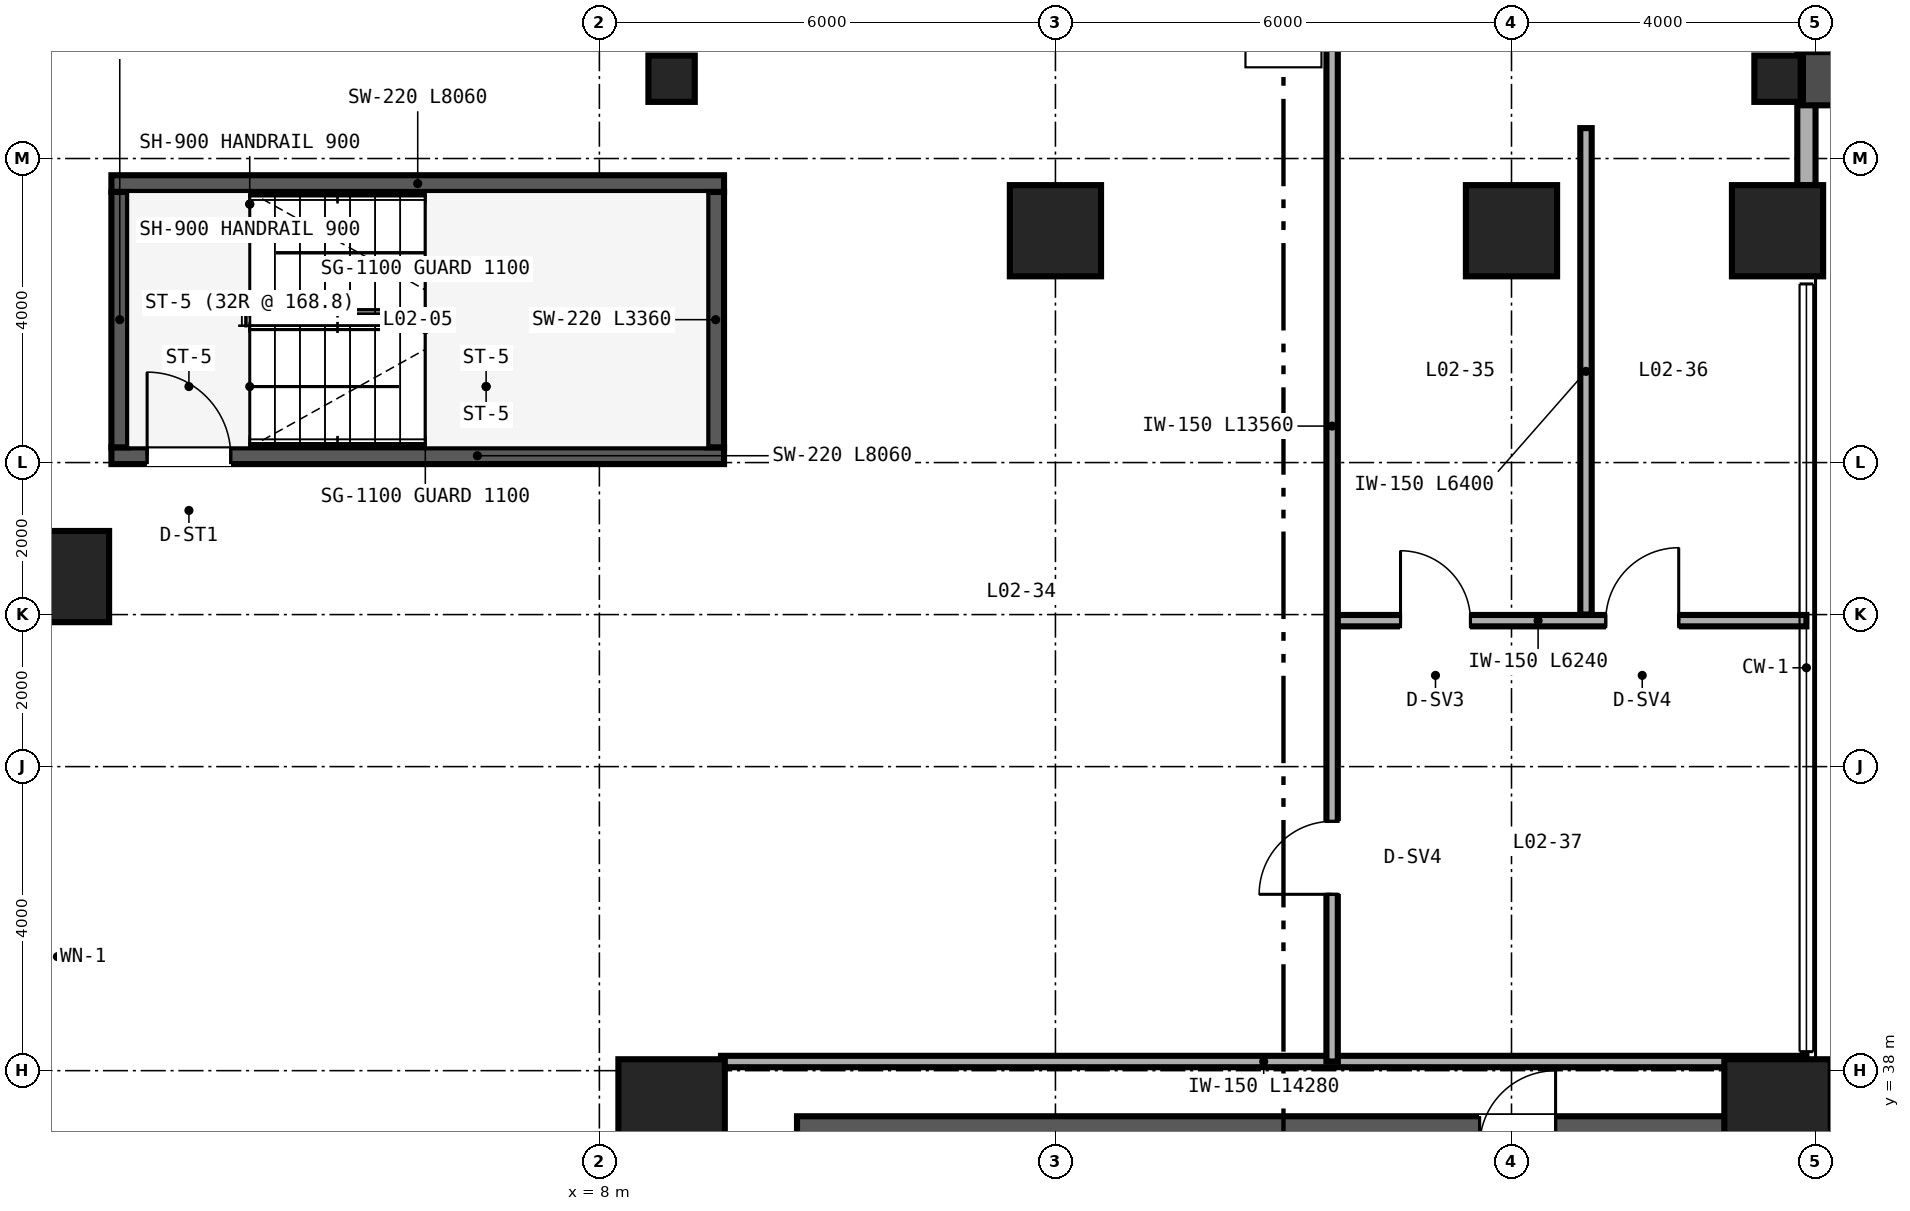
"""IFC4 building model, lengths in metres.
Left out: names, types, materials, properties, quantities, classifications, styles, units other than length and angle.
Written with IfcOpenShell. Run it as: python <this file> out.ifc"""

import sys

from ifc_helpers import new_model, si_unit, direction, frame, frame_2d, origin, origin_2d, place, context, subcontext, project, spatial, rectangle, hollow_circle, extrude, source, transform, mapped, element, fill, save


model = new_model("IFC4")
c1 = context("Model", 3, precision=1e-05, world=origin(), true_north=direction((0.0, 1.0)))
c2 = subcontext(c1, "Body", "Model", "MODEL_VIEW")
j1 = project(units=[si_unit("LENGTHUNIT", "METRE"), si_unit("PLANEANGLEUNIT", "RADIAN")], contexts=[c1])
p1 = place(None, origin())
s1 = spatial("IfcSite", under=j1, at=p1, CompositionType="ELEMENT")
p2 = place(p1, origin())
s2 = spatial("IfcBuilding", under=s1, at=p2, CompositionType="ELEMENT")
p3 = place(p2, frame((0.0, 0.0, 6.0)))
s3 = spatial("IfcBuildingStorey", under=s2, at=p3, CompositionType="ELEMENT", Elevation=6.0)
p4 = place(p3, frame((10.6, 37.0, 0.0), z_axis=(0.0, 0.0, 1.0), x_axis=(1.0, 0.0, 0.0)))
e1 = element("IfcWall", 1, at=p4, inside=s3, PredefinedType="SHEAR", context=c2, shape_type="SweptSolid", body=[
    extrude(rectangle(XDim=12.8, YDim=0.8, at=frame_2d((6.4, 0.0))), origin(), (0.0, 0.0, 1.0), 5.08),
])
p5 = place(p4, frame((8.98, 0.0, 0.0)))
e2 = element("IfcOpeningElement", 2, at=p5, cuts=e1, PredefinedType="OPENING", context=c2, shape_type="SweptSolid", body=[
    extrude(rectangle(XDim=1.0, YDim=2.15, at=frame_2d((0.5, 1.075))), frame((0.0, 0.41, 0.0), z_axis=(0.0, -1.0, 0.0), x_axis=(1.0, 0.0, 0.0)), (0.0, 0.0, 1.0), 0.82),
])
p6 = place(p3, frame((1.58, 46.09, 0.0), z_axis=(0.0, 0.0, 1.0), x_axis=(1.0, 0.0, 0.0)))
e3 = element("IfcWall", 3, at=p6, inside=s3, PredefinedType="SHEAR", context=c2, shape_type="SweptSolid", body=[
    extrude(rectangle(XDim=8.06, YDim=0.22, at=frame_2d((4.03, 0.0))), origin(), (0.0, 0.0, 1.0), 5.2),
])
p7 = place(p6, frame((0.47, 0.0, 0.0)))
e4 = element("IfcOpeningElement", 4, at=p7, cuts=e3, PredefinedType="OPENING", context=c2, shape_type="SweptSolid", body=[
    extrude(rectangle(XDim=1.1, YDim=2.15, at=frame_2d((0.55, 1.075))), frame((0.0, 0.12, 0.0), z_axis=(0.0, -1.0, 0.0), x_axis=(1.0, 0.0, 0.0)), (0.0, 0.0, 1.0), 0.24),
])
p8 = place(p3, frame((1.58, 49.67, 0.0), z_axis=(0.0, 0.0, 1.0), x_axis=(1.0, 0.0, 0.0)))
e5 = element("IfcWall", 5, at=p8, inside=s3, PredefinedType="SHEAR", context=c2, shape_type="SweptSolid", body=[
    extrude(rectangle(XDim=8.06, YDim=0.22, at=frame_2d((4.03, 0.0))), origin(), (0.0, 0.0, 1.0), 5.2),
])
for number, where, z_axis, x_axis in (
    (6, (1.69, 46.2, 0.0), (0.0, 0.0, 1.0), (0.0, 1.0, 0.0)),
    (7, (9.53, 46.2, 0.0), (0.0, 0.0, 1.0), (0.0, 1.0, 0.0)),
):
    element("IfcWall", number, at=place(p3, frame(where, z_axis=z_axis, x_axis=x_axis)), inside=s3, PredefinedType="SHEAR", context=c2, shape_type="SweptSolid", body=[
        extrude(rectangle(XDim=3.36, YDim=0.22, at=frame_2d((1.68, 0.0))), origin(), (0.0, 0.0, 1.0), 5.2),
    ])
m1 = source(origin(), c2, "Body", "SweptSolid", [
    extrude(rectangle(XDim=1.2, YDim=1.2, at=origin_2d()), origin(), (0.0, 0.0, 1.0), 5.08),
])
p9 = place(p3, frame((0.95, 44.5, 0.0), z_axis=(0.0, 0.0, 1.0), x_axis=(1.0, 0.0, 0.0)))
e8 = element("IfcColumn", 8, at=p9, inside=s3, PredefinedType="COLUMN", context=c2, shape_type="MappedRepresentation", body=[
    mapped(m1, transform((0.0, 0.0, 0.0), scale=1.0)),
])
m2 = source(origin(), c2, "Body", "SweptSolid", [
    extrude(hollow_circle(Radius=0.305, WallThickness=0.025, at=origin_2d()), origin(), (0.0, 0.0, 1.0), 5.08),
])
for number, where, z_axis, x_axis in (
    (9, (8.95, 51.05, 0.0), (0.0, 0.0, 1.0), (1.0, 0.0, 0.0)),
    (10, (23.5, 51.05, 0.0), (0.0, 0.0, 1.0), (1.0, 0.0, 0.0)),
):
    element("IfcColumn", number, at=place(p3, frame(where, z_axis=z_axis, x_axis=x_axis)), inside=s3, PredefinedType="COLUMN", context=c2, shape_type="MappedRepresentation", body=[
        mapped(m2, transform((0.0, 0.0, 0.0), scale=1.0)),
    ])
m3 = source(origin(), c2, "Body", "SweptSolid", [
    extrude(rectangle(XDim=1.4, YDim=1.4, at=origin_2d()), origin(), (0.0, 0.0, 1.0), 5.08),
])
for number, where, z_axis, x_axis in (
    (11, (8.95, 37.45, 0.0), (0.0, 0.0, 1.0), (1.0, 0.0, 0.0)),
    (12, (23.5, 37.45, 0.0), (0.0, 0.0, 1.0), (1.0, 0.0, 0.0)),
):
    element("IfcColumn", number, at=place(p3, frame(where, z_axis=z_axis, x_axis=x_axis)), inside=s3, PredefinedType="COLUMN", context=c2, shape_type="MappedRepresentation", body=[
        mapped(m3, transform((0.0, 0.0, 0.0), scale=1.0)),
    ])
for number, where, z_axis, x_axis in (
    (13, (14.0, 49.05, 0.0), (0.0, 0.0, 1.0), (1.0, 0.0, 0.0)),
    (14, (20.0, 49.05, 0.0), (0.0, 0.0, 1.0), (1.0, 0.0, 0.0)),
    (15, (23.5, 49.05, 0.0), (0.0, 0.0, 1.0), (1.0, 0.0, 0.0)),
):
    element("IfcColumn", number, at=place(p3, frame(where, z_axis=z_axis, x_axis=x_axis)), inside=s3, PredefinedType="COLUMN", context=c2, shape_type="MappedRepresentation", body=[
        mapped(m1, transform((0.0, 0.0, 0.0), scale=1.0)),
    ])
p10 = place(p3, frame((23.88, 49.65, 0.0), z_axis=(0.0, 0.0, 1.0), x_axis=(0.0, 1.0, 0.0)))
e16 = element("IfcWall", 16, at=p10, inside=s3, PredefinedType="SOLIDWALL", context=c2, shape_type="SweptSolid", body=[
    extrude(rectangle(XDim=2.05, YDim=0.24, at=frame_2d((1.025, 0.0))), origin(), (0.0, 0.0, 1.0), 4.153),
])
p11 = place(p3, frame((20.98, 44.0, 0.0), z_axis=(0.0, 0.0, 1.0), x_axis=(0.0, 1.0, 0.0)))
e17 = element("IfcWall", 17, at=p11, inside=s3, PredefinedType="PARTITIONING", context=c2, shape_type="SweptSolid", body=[
    extrude(rectangle(XDim=6.4, YDim=0.15, at=frame_2d((3.2, 0.0))), origin(), (0.0, 0.0, 1.0), 4.543),
])
p12 = place(p3, frame((17.64, 43.92, 0.0), z_axis=(0.0, 0.0, 1.0), x_axis=(1.0, 0.0, 0.0)))
e18 = element("IfcWall", 18, at=p12, inside=s3, PredefinedType="PARTITIONING", context=c2, shape_type="SweptSolid", body=[
    extrude(rectangle(XDim=6.24, YDim=0.15, at=frame_2d((3.12, 0.0))), origin(), (0.0, 0.0, 1.0), 4.301),
])
p13 = place(p12, frame((0.9, 0.0, 0.0)))
e19 = element("IfcOpeningElement", 19, at=p13, cuts=e18, PredefinedType="OPENING", context=c2, shape_type="SweptSolid", body=[
    extrude(rectangle(XDim=0.92, YDim=2.15, at=frame_2d((0.46, 1.075))), frame((0.0, 0.085, 0.0), z_axis=(0.0, -1.0, 0.0), x_axis=(1.0, 0.0, 0.0)), (0.0, 0.0, 1.0), 0.17),
])
p14 = place(p12, frame((3.6, 0.0, 0.0)))
e20 = element("IfcOpeningElement", 20, at=p14, cuts=e18, PredefinedType="OPENING", context=c2, shape_type="SweptSolid", body=[
    extrude(rectangle(XDim=0.96, YDim=2.15, at=frame_2d((0.48, 1.075))), frame((0.0, 0.085, 0.0), z_axis=(0.0, -1.0, 0.0), x_axis=(1.0, 0.0, 0.0)), (0.0, 0.0, 1.0), 0.17),
])
p15 = place(p3, frame((9.6, 38.12, 0.0), z_axis=(0.0, 0.0, 1.0), x_axis=(1.0, 0.0, 0.0)))
e21 = element("IfcWall", 21, at=p15, inside=s3, PredefinedType="PARTITIONING", context=c2, shape_type="SweptSolid", body=[
    extrude(rectangle(XDim=14.28, YDim=0.15, at=frame_2d((7.14, 0.0))), origin(), (0.0, 0.0, 1.0), 4.301),
])
p16 = place(p3, frame((17.64, 38.12, 0.0), z_axis=(0.0, 0.0, 1.0), x_axis=(0.0, 1.0, 0.0)))
e22 = element("IfcWall", 22, at=p16, inside=s3, PredefinedType="PARTITIONING", context=c2, shape_type="SweptSolid", body=[
    extrude(rectangle(XDim=13.56, YDim=0.15, at=frame_2d((6.78, 0.0))), origin(), (0.0, 0.0, 1.0), 4.153),
])
p17 = place(p16, frame((2.2, 0.0, 0.0)))
e23 = element("IfcOpeningElement", 23, at=p17, cuts=e22, PredefinedType="OPENING", context=c2, shape_type="SweptSolid", body=[
    extrude(rectangle(XDim=0.96, YDim=2.15, at=frame_2d((0.48, 1.075))), frame((0.0, 0.085, 0.0), z_axis=(0.0, -1.0, 0.0), x_axis=(1.0, 0.0, 0.0)), (0.0, 0.0, 1.0), 0.17),
])
m4 = source(origin(), c2, "Body", "SweptSolid", [
    extrude(rectangle(XDim=1.1, YDim=2.15, at=frame_2d((0.55, 1.075))), frame((0.0, 0.025, 0.0), z_axis=(0.0, -1.0, 0.0), x_axis=(1.0, 0.0, 0.0)), (0.0, 0.0, 1.0), 0.05),
])
p18 = place(p7, origin())
e24 = element("IfcDoor", 24, at=p18, inside=s3, OperationType="SINGLE_SWING_LEFT", PredefinedType="DOOR", context=c2, shape_type="MappedRepresentation", body=[
    mapped(m4, transform((0.0, 0.0, 0.0), scale=1.0)),
])
fill(e4, e24)
m5 = source(origin(), c2, "Body", "SweptSolid", [
    extrude(rectangle(XDim=0.92, YDim=2.15, at=frame_2d((0.46, 1.075))), frame((0.0, 0.025, 0.0), z_axis=(0.0, -1.0, 0.0), x_axis=(1.0, 0.0, 0.0)), (0.0, 0.0, 1.0), 0.05),
])
p19 = place(p13, origin())
e25 = element("IfcDoor", 25, at=p19, inside=s3, OperationType="SINGLE_SWING_LEFT", PredefinedType="DOOR", context=c2, shape_type="MappedRepresentation", body=[
    mapped(m5, transform((0.0, 0.0, 0.0), scale=1.0)),
])
fill(e19, e25)
m6 = source(origin(), c2, "Body", "SweptSolid", [
    extrude(rectangle(XDim=0.96, YDim=2.15, at=frame_2d((0.48, 1.075))), frame((0.0, 0.025, 0.0), z_axis=(0.0, -1.0, 0.0), x_axis=(1.0, 0.0, 0.0)), (0.0, 0.0, 1.0), 0.05),
])
p20 = place(p14, origin())
e26 = element("IfcDoor", 26, at=p20, inside=s3, OperationType="SINGLE_SWING_RIGHT", PredefinedType="DOOR", context=c2, shape_type="MappedRepresentation", body=[
    mapped(m6, transform((0.0, 0.0, 0.0), scale=1.0)),
])
fill(e20, e26)
p21 = place(p17, origin())
e27 = element("IfcDoor", 27, at=p21, inside=s3, OperationType="SINGLE_SWING_LEFT", PredefinedType="DOOR", context=c2, shape_type="MappedRepresentation", body=[
    mapped(m6, transform((0.0, 0.0, 0.0), scale=1.0)),
])
fill(e23, e27)
save(model, sys.argv[1])
